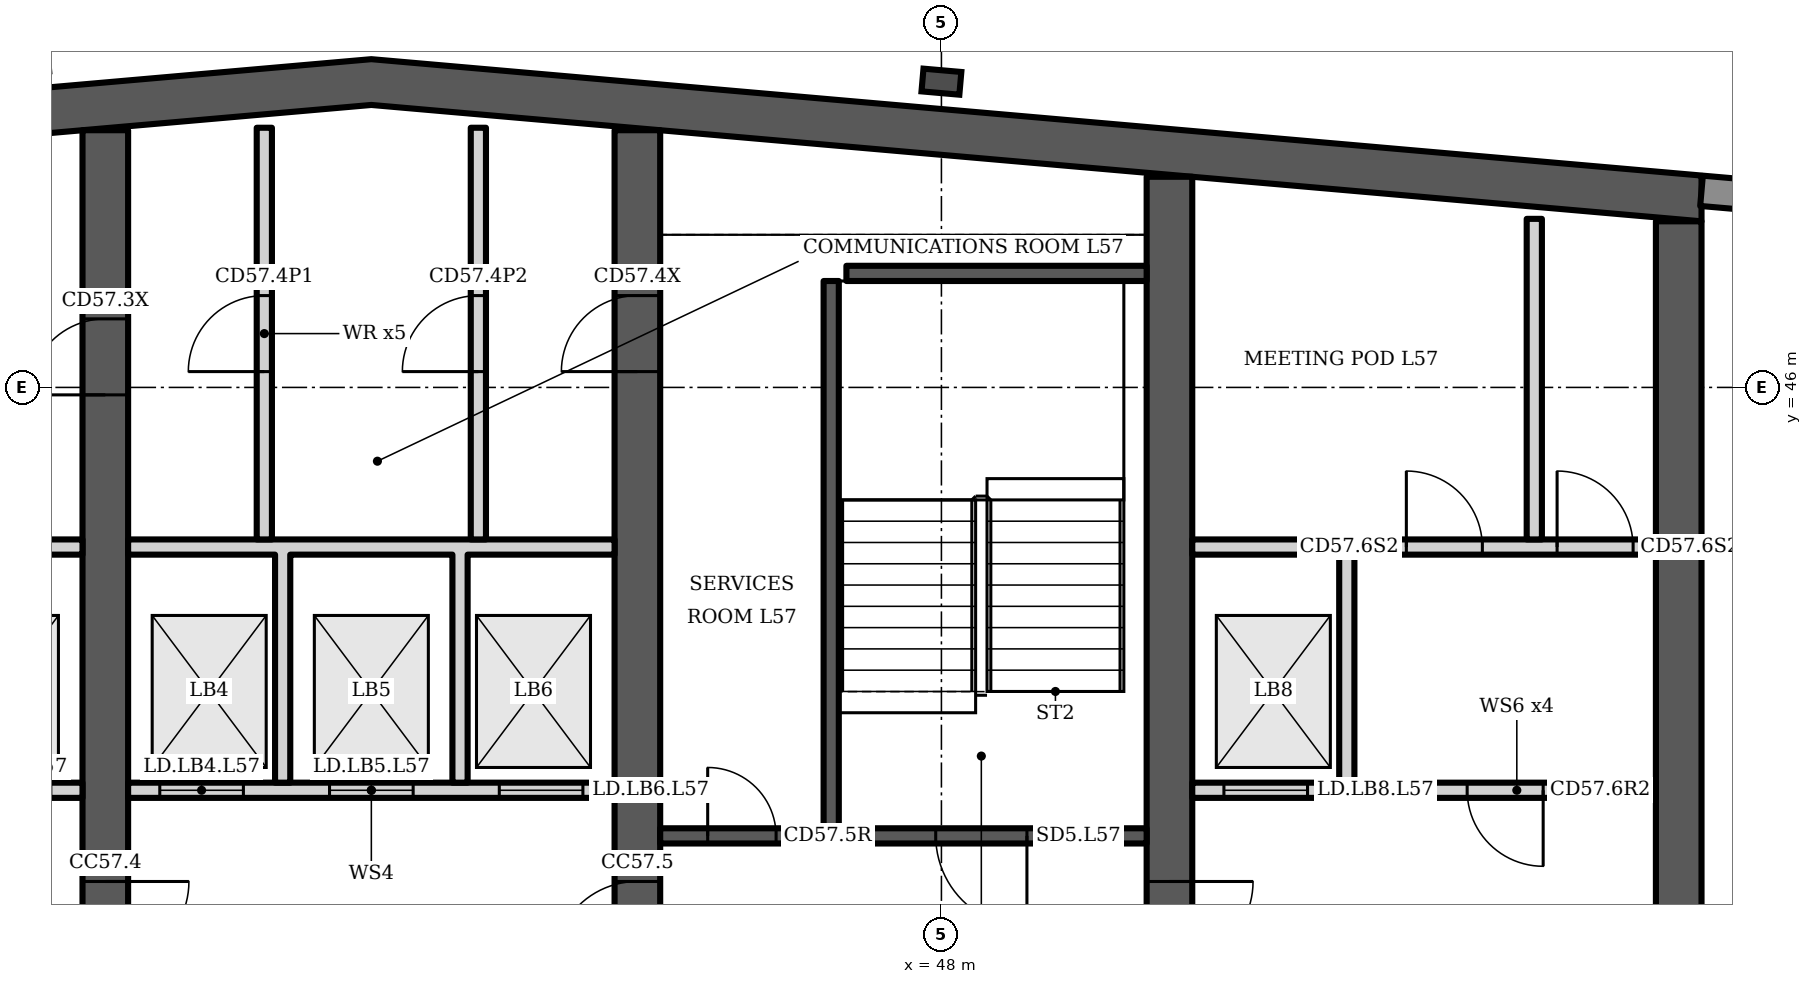
"""IFC4 building model, lengths in metres.
Left out: names, types, materials, properties, quantities, classifications, styles, units other than length and angle.
Written with IfcOpenShell. Run it as: python <this file> out.ifc"""

import sys

from ifc_helpers import new_model, si_unit, direction, frame, frame_2d, origin, origin_2d, place, context, subcontext, project, spatial, polyline, rectangle, i_section, outline, extrude, element, fill, save


model = new_model("IFC4")
c1 = context("Model", 3, precision=1e-05, world=origin(), true_north=direction((0.0, 1.0)))
c2 = subcontext(c1, "Body", "Model", "MODEL_VIEW")
j1 = project(units=[si_unit("LENGTHUNIT", "METRE"), si_unit("PLANEANGLEUNIT", "RADIAN")], contexts=[c1])
p1 = place(None, origin())
s1 = spatial("IfcSite", under=j1, at=p1, CompositionType="ELEMENT")
p2 = place(p1, origin())
s2 = spatial("IfcBuilding", under=s1, at=p2, CompositionType="ELEMENT")
p3 = place(p2, frame((0.0, 0.0, 228.7)))
s3 = spatial("IfcBuildingStorey", under=s2, at=p3, CompositionType="ELEMENT", Elevation=228.7)
p4 = place(p3, origin())
e1 = element("IfcWall", 1, at=p4, inside=s3, PredefinedType="SHEAR", context=c2, shape_type="SweptSolid", body=[
    extrude(outline(polyline([(23.0, 48.185), (40.5, 49.716), (58.0, 48.185), (58.0, 48.787), (40.5, 50.318), (23.0, 48.787), (23.0, 48.185)])), origin(), (0.0, 0.0, 1.0), 3.6),
])
p5 = place(p3, frame((37.0, 34.6, 0.0), z_axis=(0.0, 0.0, 1.0), x_axis=(0.0, 1.0, 0.0)))
e2 = element("IfcWall", 2, at=p5, inside=s3, PredefinedType="SHEAR", context=c2, shape_type="SweptSolid", body=[
    extrude(rectangle(XDim=14.784, YDim=0.6, at=frame_2d((7.392, 0.0))), origin(), (0.0, 0.0, 1.0), 3.6),
])
p6 = place(p5, frame((11.302, 0.0, 0.0)))
e3 = element("IfcOpeningElement", 3, at=p6, cuts=e2, PredefinedType="OPENING", context=c2, shape_type="SweptSolid", body=[
    extrude(rectangle(XDim=1.0, YDim=2.1, at=frame_2d((0.5, 1.05))), frame((0.0, 0.31, 0.0), z_axis=(0.0, -1.0, 0.0), x_axis=(1.0, 0.0, 0.0)), (0.0, 0.0, 1.0), 0.62),
])
p7 = place(p5, frame((3.8, 0.0, 0.0)))
e4 = element("IfcOpeningElement", 4, at=p7, cuts=e2, PredefinedType="OPENING", context=c2, shape_type="SweptSolid", body=[
    extrude(rectangle(XDim=1.1, YDim=2.1, at=frame_2d((0.55, 1.05))), frame((0.0, 0.31, 0.0), z_axis=(0.0, -1.0, 0.0), x_axis=(1.0, 0.0, 0.0)), (0.0, 0.0, 1.0), 0.62),
])
p8 = place(p3, frame((44.0, 34.6, 0.0), z_axis=(0.0, 0.0, 1.0), x_axis=(0.0, 1.0, 0.0)))
e5 = element("IfcWall", 5, at=p8, inside=s3, PredefinedType="SHEAR", context=c2, shape_type="SweptSolid", body=[
    extrude(rectangle(XDim=14.784, YDim=0.6, at=frame_2d((7.392, 0.0))), origin(), (0.0, 0.0, 1.0), 3.6),
])
p9 = place(p8, frame((11.608, 0.0, 0.0)))
e6 = element("IfcOpeningElement", 6, at=p9, cuts=e5, PredefinedType="OPENING", context=c2, shape_type="SweptSolid", body=[
    extrude(rectangle(XDim=1.0, YDim=2.1, at=frame_2d((0.5, 1.05))), frame((0.0, 0.31, 0.0), z_axis=(0.0, -1.0, 0.0), x_axis=(1.0, 0.0, 0.0)), (0.0, 0.0, 1.0), 0.62),
])
p10 = place(p8, frame((3.8, 0.0, 0.0)))
e7 = element("IfcOpeningElement", 7, at=p10, cuts=e5, PredefinedType="OPENING", context=c2, shape_type="SweptSolid", body=[
    extrude(rectangle(XDim=1.1, YDim=2.1, at=frame_2d((0.55, 1.05))), frame((0.0, 0.31, 0.0), z_axis=(0.0, -1.0, 0.0), x_axis=(1.0, 0.0, 0.0)), (0.0, 0.0, 1.0), 0.62),
])
p11 = place(p3, frame((51.0, 34.6, 0.0), z_axis=(0.0, 0.0, 1.0), x_axis=(0.0, 1.0, 0.0)))
e8 = element("IfcWall", 8, at=p11, inside=s3, PredefinedType="SHEAR", context=c2, shape_type="SweptSolid", body=[
    extrude(rectangle(XDim=14.171, YDim=0.6, at=frame_2d((7.085, 0.0))), origin(), (0.0, 0.0, 1.0), 3.6),
])
p12 = place(p11, frame((3.8, 0.0, 0.0)))
e9 = element("IfcOpeningElement", 9, at=p12, cuts=e8, PredefinedType="OPENING", context=c2, shape_type="SweptSolid", body=[
    extrude(rectangle(XDim=1.1, YDim=2.1, at=frame_2d((0.55, 1.05))), frame((0.0, 0.31, 0.0), z_axis=(0.0, -1.0, 0.0), x_axis=(1.0, 0.0, 0.0)), (0.0, 0.0, 1.0), 0.62),
])
p13 = place(p3, frame((57.7, 34.6, 0.0), z_axis=(0.0, 0.0, 1.0), x_axis=(0.0, 1.0, 0.0)))
e10 = element("IfcWall", 10, at=p13, inside=s3, PredefinedType="SHEAR", context=c2, shape_type="SweptSolid", body=[
    extrude(rectangle(XDim=13.585, YDim=0.6, at=frame_2d((6.792, 0.0))), origin(), (0.0, 0.0, 1.0), 3.6),
])
p14 = place(p3, frame((48.0, 50.022, 0.0), z_axis=(0.0, 0.0, 1.0), x_axis=(0.087156, 0.996197, 0.0)))
e11 = element("IfcColumn", 11, at=p14, inside=s3, PredefinedType="COLUMN", context=c2, shape_type="SweptSolid", body=[
    extrude(i_section(OverallWidth=0.3, OverallDepth=0.5, WebThickness=0.014, FlangeThickness=0.028, FilletRadius=0.027, at=origin_2d()), origin(), (0.0, 0.0, 1.0), 3.6),
])
p15 = place(p3, frame((60.983, 48.326, 0.0), z_axis=(0.0, 0.0, 1.0), x_axis=(-0.996194, 0.087168, 0.0)))
e12 = element("IfcWall", 12, at=p15, inside=s3, PredefinedType="SOLIDWALL", context=c2, shape_type="SweptSolid", body=[
    extrude(rectangle(XDim=2.994, YDim=0.4, at=frame_2d((1.497, 0.0))), origin(), (0.0, 0.0, 1.0), 3.2),
])
p16 = place(p3, frame((30.3, 40.7, 0.0), z_axis=(0.0, 0.0, 1.0), x_axis=(1.0, 0.0, 0.0)))
e13 = element("IfcWall", 13, at=p16, inside=s3, PredefinedType="PARTITIONING", context=c2, shape_type="SweptSolid", body=[
    extrude(rectangle(XDim=6.4, YDim=0.2, at=frame_2d((3.2, 0.0))), origin(), (0.0, 0.0, 1.0), 3.2),
])
p17 = place(p16, frame((0.417, 0.0, 0.0)))
e14 = element("IfcOpeningElement", 14, at=p17, cuts=e13, PredefinedType="OPENING", context=c2, shape_type="SweptSolid", body=[
    extrude(rectangle(XDim=1.1, YDim=2.1, at=frame_2d((0.55, 1.05))), frame((0.0, 0.11, 0.0), z_axis=(0.0, -1.0, 0.0), x_axis=(1.0, 0.0, 0.0)), (0.0, 0.0, 1.0), 0.22),
])
p18 = place(p16, frame((2.65, 0.0, 0.0)))
e15 = element("IfcOpeningElement", 15, at=p18, cuts=e13, PredefinedType="OPENING", context=c2, shape_type="SweptSolid", body=[
    extrude(rectangle(XDim=1.1, YDim=2.1, at=frame_2d((0.55, 1.05))), frame((0.0, 0.11, 0.0), z_axis=(0.0, -1.0, 0.0), x_axis=(1.0, 0.0, 0.0)), (0.0, 0.0, 1.0), 0.22),
])
p19 = place(p16, frame((4.883, 0.0, 0.0)))
e16 = element("IfcOpeningElement", 16, at=p19, cuts=e13, PredefinedType="OPENING", context=c2, shape_type="SweptSolid", body=[
    extrude(rectangle(XDim=1.1, YDim=2.1, at=frame_2d((0.55, 1.05))), frame((0.0, 0.11, 0.0), z_axis=(0.0, -1.0, 0.0), x_axis=(1.0, 0.0, 0.0)), (0.0, 0.0, 1.0), 0.22),
])
p20 = place(p3, frame((0.0, 0.0, -0.0)))
e17 = element("IfcWall", 17, at=p20, inside=s3, PredefinedType="PARTITIONING", context=c2, shape_type="SweptSolid", body=[
    extrude(outline(polyline([(32.433, 40.8), (32.233, 40.8), (32.233, 43.8), (30.3, 43.8), (30.3, 44.0), (36.7, 44.0), (36.7, 43.8), (34.767, 43.8), (34.767, 40.8), (34.567, 40.8), (34.567, 43.8), (32.433, 43.8), (32.433, 40.8)])), origin(), (0.0, 0.0, 1.0), 3.2),
])
p21 = place(p3, frame((37.3, 40.7, 0.0), z_axis=(0.0, 0.0, 1.0), x_axis=(1.0, 0.0, 0.0)))
e18 = element("IfcWall", 18, at=p21, inside=s3, PredefinedType="PARTITIONING", context=c2, shape_type="SweptSolid", body=[
    extrude(rectangle(XDim=6.4, YDim=0.2, at=frame_2d((3.2, 0.0))), origin(), (0.0, 0.0, 1.0), 3.2),
])
p22 = place(p21, frame((0.417, 0.0, 0.0)))
e19 = element("IfcOpeningElement", 19, at=p22, cuts=e18, PredefinedType="OPENING", context=c2, shape_type="SweptSolid", body=[
    extrude(rectangle(XDim=1.1, YDim=2.1, at=frame_2d((0.55, 1.05))), frame((0.0, 0.11, 0.0), z_axis=(0.0, -1.0, 0.0), x_axis=(1.0, 0.0, 0.0)), (0.0, 0.0, 1.0), 0.22),
])
p23 = place(p21, frame((2.65, 0.0, 0.0)))
e20 = element("IfcOpeningElement", 20, at=p23, cuts=e18, PredefinedType="OPENING", context=c2, shape_type="SweptSolid", body=[
    extrude(rectangle(XDim=1.1, YDim=2.1, at=frame_2d((0.55, 1.05))), frame((0.0, 0.11, 0.0), z_axis=(0.0, -1.0, 0.0), x_axis=(1.0, 0.0, 0.0)), (0.0, 0.0, 1.0), 0.22),
])
p24 = place(p21, frame((4.883, 0.0, 0.0)))
e21 = element("IfcOpeningElement", 21, at=p24, cuts=e18, PredefinedType="OPENING", context=c2, shape_type="SweptSolid", body=[
    extrude(rectangle(XDim=1.1, YDim=2.1, at=frame_2d((0.55, 1.05))), frame((0.0, 0.11, 0.0), z_axis=(0.0, -1.0, 0.0), x_axis=(1.0, 0.0, 0.0)), (0.0, 0.0, 1.0), 0.22),
])
p25 = place(p3, frame((0.0, 0.0, -0.0)))
e22 = element("IfcWall", 22, at=p25, inside=s3, PredefinedType="PARTITIONING", context=c2, shape_type="SweptSolid", body=[
    extrude(outline(polyline([(39.433, 40.8), (39.233, 40.8), (39.233, 43.8), (37.3, 43.8), (37.3, 44.0), (43.7, 44.0), (43.7, 43.8), (41.767, 43.8), (41.767, 40.8), (41.567, 40.8), (41.567, 43.8), (39.433, 43.8), (39.433, 40.8)])), origin(), (0.0, 0.0, 1.0), 3.2),
])
p26 = place(p3, frame((39.092, 44.0, 0.0), z_axis=(0.0, 0.0, 1.0), x_axis=(0.0, 1.0, 0.0)))
e23 = element("IfcWall", 23, at=p26, inside=s3, PredefinedType="PARTITIONING", context=c2, shape_type="SweptSolid", body=[
    extrude(rectangle(XDim=5.416, YDim=0.2, at=frame_2d((2.708, 0.0))), origin(), (0.0, 0.0, 1.0), 3.2),
])
p27 = place(p26, frame((2.208, 0.0, 0.0)))
e24 = element("IfcOpeningElement", 24, at=p27, cuts=e23, PredefinedType="OPENING", context=c2, shape_type="SweptSolid", body=[
    extrude(rectangle(XDim=1.0, YDim=2.1, at=frame_2d((0.5, 1.05))), frame((0.0, 0.11, 0.0), z_axis=(0.0, -1.0, 0.0), x_axis=(1.0, 0.0, 0.0)), (0.0, 0.0, 1.0), 0.22),
])
p28 = place(p3, frame((41.908, 44.0, 0.0), z_axis=(0.0, 0.0, 1.0), x_axis=(0.0, 1.0, 0.0)))
e25 = element("IfcWall", 25, at=p28, inside=s3, PredefinedType="PARTITIONING", context=c2, shape_type="SweptSolid", body=[
    extrude(rectangle(XDim=5.416, YDim=0.2, at=frame_2d((2.708, 0.0))), origin(), (0.0, 0.0, 1.0), 3.2),
])
p29 = place(p28, frame((2.208, 0.0, 0.0)))
e26 = element("IfcOpeningElement", 26, at=p29, cuts=e25, PredefinedType="OPENING", context=c2, shape_type="SweptSolid", body=[
    extrude(rectangle(XDim=1.0, YDim=2.1, at=frame_2d((0.5, 1.05))), frame((0.0, 0.11, 0.0), z_axis=(0.0, -1.0, 0.0), x_axis=(1.0, 0.0, 0.0)), (0.0, 0.0, 1.0), 0.22),
])
p30 = place(p3, frame((44.3, 40.1, 0.0), z_axis=(0.0, 0.0, 1.0), x_axis=(1.0, 0.0, 0.0)))
e27 = element("IfcWall", 27, at=p30, inside=s3, PredefinedType="SHEAR", context=c2, shape_type="SweptSolid", body=[
    extrude(rectangle(XDim=6.4, YDim=0.2, at=frame_2d((3.2, 0.0))), origin(), (0.0, 0.0, 1.0), 3.2),
])
p31 = place(p30, frame((3.625, 0.0, 0.0)))
e28 = element("IfcOpeningElement", 28, at=p31, cuts=e27, PredefinedType="OPENING", context=c2, shape_type="SweptSolid", body=[
    extrude(rectangle(XDim=1.2, YDim=2.1, at=frame_2d((0.6, 1.05))), frame((0.0, 0.11, 0.0), z_axis=(0.0, -1.0, 0.0), x_axis=(1.0, 0.0, 0.0)), (0.0, 0.0, 1.0), 0.22),
])
p32 = place(p30, frame((0.625, 0.0, 0.0)))
e29 = element("IfcOpeningElement", 29, at=p32, cuts=e27, PredefinedType="OPENING", context=c2, shape_type="SweptSolid", body=[
    extrude(rectangle(XDim=0.9, YDim=2.1, at=frame_2d((0.45, 1.05))), frame((0.0, 0.11, 0.0), z_axis=(0.0, -1.0, 0.0), x_axis=(1.0, 0.0, 0.0)), (0.0, 0.0, 1.0), 0.22),
])
p33 = place(p3, frame((46.55, 40.2, 0.0), z_axis=(0.0, 0.0, 1.0), x_axis=(0.0, 1.0, 0.0)))
e30 = element("IfcWall", 30, at=p33, inside=s3, PredefinedType="SHEAR", context=c2, shape_type="SweptSolid", body=[
    extrude(rectangle(XDim=7.2, YDim=0.2, at=frame_2d((3.6, 0.0))), origin(), (0.0, 0.0, 1.0), 3.2),
])
p34 = place(p3, frame((46.75, 47.5, 0.0), z_axis=(0.0, 0.0, 1.0), x_axis=(1.0, 0.0, 0.0)))
e31 = element("IfcWall", 31, at=p34, inside=s3, PredefinedType="SHEAR", context=c2, shape_type="SweptSolid", body=[
    extrude(rectangle(XDim=3.95, YDim=0.2, at=frame_2d((1.975, 0.0))), origin(), (0.0, 0.0, 1.0), 3.2),
])
p35 = place(p3, frame((51.3, 40.7, 0.0), z_axis=(0.0, 0.0, 1.0), x_axis=(1.0, 0.0, 0.0)))
e32 = element("IfcWall", 32, at=p35, inside=s3, PredefinedType="PARTITIONING", context=c2, shape_type="SweptSolid", body=[
    extrude(rectangle(XDim=6.1, YDim=0.2, at=frame_2d((3.05, 0.0))), origin(), (0.0, 0.0, 1.0), 3.2),
])
p36 = place(p35, frame((0.417, 0.0, 0.0)))
e33 = element("IfcOpeningElement", 33, at=p36, cuts=e32, PredefinedType="OPENING", context=c2, shape_type="SweptSolid", body=[
    extrude(rectangle(XDim=1.1, YDim=2.1, at=frame_2d((0.55, 1.05))), frame((0.0, 0.11, 0.0), z_axis=(0.0, -1.0, 0.0), x_axis=(1.0, 0.0, 0.0)), (0.0, 0.0, 1.0), 0.22),
])
p37 = place(p35, frame((3.617, 0.0, 0.0)))
e34 = element("IfcOpeningElement", 34, at=p37, cuts=e32, PredefinedType="OPENING", context=c2, shape_type="SweptSolid", body=[
    extrude(rectangle(XDim=1.0, YDim=2.1, at=frame_2d((0.5, 1.05))), frame((0.0, 0.11, 0.0), z_axis=(0.0, -1.0, 0.0), x_axis=(1.0, 0.0, 0.0)), (0.0, 0.0, 1.0), 0.22),
])
p38 = place(p3, frame((51.3, 43.9, 0.0), z_axis=(0.0, 0.0, 1.0), x_axis=(1.0, 0.0, 0.0)))
e35 = element("IfcWall", 35, at=p38, inside=s3, PredefinedType="PARTITIONING", context=c2, shape_type="SweptSolid", body=[
    extrude(rectangle(XDim=6.1, YDim=0.2, at=frame_2d((3.05, 0.0))), origin(), (0.0, 0.0, 1.0), 3.2),
])
p39 = place(p38, frame((2.817, 0.0, 0.0)))
e36 = element("IfcOpeningElement", 36, at=p39, cuts=e35, PredefinedType="OPENING", context=c2, shape_type="SweptSolid", body=[
    extrude(rectangle(XDim=1.0, YDim=2.1, at=frame_2d((0.5, 1.05))), frame((0.0, 0.11, 0.0), z_axis=(0.0, -1.0, 0.0), x_axis=(1.0, 0.0, 0.0)), (0.0, 0.0, 1.0), 0.22),
])
p40 = place(p38, frame((4.8, 0.0, 0.0)))
e37 = element("IfcOpeningElement", 37, at=p40, cuts=e35, PredefinedType="OPENING", context=c2, shape_type="SweptSolid", body=[
    extrude(rectangle(XDim=1.0, YDim=2.1, at=frame_2d((0.5, 1.05))), frame((0.0, 0.11, 0.0), z_axis=(0.0, -1.0, 0.0), x_axis=(1.0, 0.0, 0.0)), (0.0, 0.0, 1.0), 0.22),
])
p41 = place(p3, frame((0.0, 0.0, -0.0)))
e38 = element("IfcWall", 38, at=p41, inside=s3, PredefinedType="PARTITIONING", context=c2, shape_type="SweptSolid", body=[
    extrude(outline(polyline([(53.433, 40.8), (53.433, 43.8), (53.233, 43.8), (53.233, 40.8), (53.433, 40.8)])), origin(), (0.0, 0.0, 1.0), 3.2),
])
p42 = place(p3, frame((55.8, 44.0, 0.0), z_axis=(0.0, 0.0, 1.0), x_axis=(0.0, 1.0, 0.0)))
e39 = element("IfcWall", 39, at=p42, inside=s3, PredefinedType="PARTITIONING", context=c2, shape_type="SweptSolid", body=[
    extrude(rectangle(XDim=4.218, YDim=0.2, at=frame_2d((2.109, 0.0))), origin(), (0.0, 0.0, 1.0), 3.2),
])
p43 = place(p6, origin())
e40 = element("IfcDoor", 40, at=p43, inside=s3, OperationType="SINGLE_SWING_LEFT", PredefinedType="DOOR", context=c2, shape_type="SweptSolid", body=[
    extrude(rectangle(XDim=1.0, YDim=2.1, at=frame_2d((0.5, 1.05))), frame((0.0, 0.025, 0.0), z_axis=(0.0, -1.0, 0.0), x_axis=(1.0, 0.0, 0.0)), (0.0, 0.0, 1.0), 0.05),
])
fill(e3, e40)
p44 = place(p22, origin())
e41 = element("IfcDoor", 41, at=p44, inside=s3, OperationType="DOUBLE_DOOR_SLIDING", PredefinedType="DOOR", context=c2, shape_type="SweptSolid", body=[
    extrude(rectangle(XDim=1.1, YDim=2.1, at=frame_2d((0.55, 1.05))), frame((0.0, 0.025, 0.0), z_axis=(0.0, -1.0, 0.0), x_axis=(1.0, 0.0, 0.0)), (0.0, 0.0, 1.0), 0.05),
])
fill(e19, e41)
p45 = place(p23, origin())
e42 = element("IfcDoor", 42, at=p45, inside=s3, OperationType="DOUBLE_DOOR_SLIDING", PredefinedType="DOOR", context=c2, shape_type="SweptSolid", body=[
    extrude(rectangle(XDim=1.1, YDim=2.1, at=frame_2d((0.55, 1.05))), frame((0.0, 0.025, 0.0), z_axis=(0.0, -1.0, 0.0), x_axis=(1.0, 0.0, 0.0)), (0.0, 0.0, 1.0), 0.05),
])
fill(e20, e42)
p46 = place(p24, origin())
e43 = element("IfcDoor", 43, at=p46, inside=s3, OperationType="DOUBLE_DOOR_SLIDING", PredefinedType="DOOR", context=c2, shape_type="SweptSolid", body=[
    extrude(rectangle(XDim=1.1, YDim=2.1, at=frame_2d((0.55, 1.05))), frame((0.0, 0.025, 0.0), z_axis=(0.0, -1.0, 0.0), x_axis=(1.0, 0.0, 0.0)), (0.0, 0.0, 1.0), 0.05),
])
fill(e21, e43)
p47 = place(p27, origin())
e44 = element("IfcDoor", 44, at=p47, inside=s3, OperationType="SINGLE_SWING_LEFT", PredefinedType="DOOR", context=c2, shape_type="SweptSolid", body=[
    extrude(rectangle(XDim=1.0, YDim=2.1, at=frame_2d((0.5, 1.05))), frame((0.0, 0.025, 0.0), z_axis=(0.0, -1.0, 0.0), x_axis=(1.0, 0.0, 0.0)), (0.0, 0.0, 1.0), 0.05),
])
fill(e24, e44)
p48 = place(p29, origin())
e45 = element("IfcDoor", 45, at=p48, inside=s3, OperationType="SINGLE_SWING_LEFT", PredefinedType="DOOR", context=c2, shape_type="SweptSolid", body=[
    extrude(rectangle(XDim=1.0, YDim=2.1, at=frame_2d((0.5, 1.05))), frame((0.0, 0.025, 0.0), z_axis=(0.0, -1.0, 0.0), x_axis=(1.0, 0.0, 0.0)), (0.0, 0.0, 1.0), 0.05),
])
fill(e26, e45)
p49 = place(p9, origin())
e46 = element("IfcDoor", 46, at=p49, inside=s3, OperationType="SINGLE_SWING_LEFT", PredefinedType="DOOR", context=c2, shape_type="SweptSolid", body=[
    extrude(rectangle(XDim=1.0, YDim=2.1, at=frame_2d((0.5, 1.05))), frame((0.0, 0.025, 0.0), z_axis=(0.0, -1.0, 0.0), x_axis=(1.0, 0.0, 0.0)), (0.0, 0.0, 1.0), 0.05),
])
fill(e6, e46)
p50 = place(p31, origin())
e47 = element("IfcDoor", 47, at=p50, inside=s3, OperationType="SINGLE_SWING_RIGHT", PredefinedType="DOOR", context=c2, shape_type="SweptSolid", body=[
    extrude(rectangle(XDim=1.2, YDim=2.1, at=frame_2d((0.6, 1.05))), frame((0.0, 0.025, 0.0), z_axis=(0.0, -1.0, 0.0), x_axis=(1.0, 0.0, 0.0)), (0.0, 0.0, 1.0), 0.05),
])
fill(e28, e47)
p51 = place(p32, origin())
e48 = element("IfcDoor", 48, at=p51, inside=s3, OperationType="SINGLE_SWING_LEFT", PredefinedType="DOOR", context=c2, shape_type="SweptSolid", body=[
    extrude(rectangle(XDim=0.9, YDim=2.1, at=frame_2d((0.45, 1.05))), frame((0.0, 0.025, 0.0), z_axis=(0.0, -1.0, 0.0), x_axis=(1.0, 0.0, 0.0)), (0.0, 0.0, 1.0), 0.05),
])
fill(e29, e48)
p52 = place(p36, origin())
e49 = element("IfcDoor", 49, at=p52, inside=s3, OperationType="DOUBLE_DOOR_SLIDING", PredefinedType="DOOR", context=c2, shape_type="SweptSolid", body=[
    extrude(rectangle(XDim=1.1, YDim=2.1, at=frame_2d((0.55, 1.05))), frame((0.0, 0.025, 0.0), z_axis=(0.0, -1.0, 0.0), x_axis=(1.0, 0.0, 0.0)), (0.0, 0.0, 1.0), 0.05),
])
fill(e33, e49)
p53 = place(p37, origin())
e50 = element("IfcDoor", 50, at=p53, inside=s3, OperationType="SINGLE_SWING_RIGHT", PredefinedType="DOOR", context=c2, shape_type="SweptSolid", body=[
    extrude(rectangle(XDim=1.0, YDim=2.1, at=frame_2d((0.5, 1.05))), frame((0.0, 0.025, 0.0), z_axis=(0.0, -1.0, 0.0), x_axis=(1.0, 0.0, 0.0)), (0.0, 0.0, 1.0), 0.05),
])
fill(e34, e50)
p54 = place(p39, origin())
e51 = element("IfcDoor", 51, at=p54, inside=s3, OperationType="SINGLE_SWING_LEFT", PredefinedType="DOOR", context=c2, shape_type="SweptSolid", body=[
    extrude(rectangle(XDim=1.0, YDim=2.1, at=frame_2d((0.5, 1.05))), frame((0.0, 0.025, 0.0), z_axis=(0.0, -1.0, 0.0), x_axis=(1.0, 0.0, 0.0)), (0.0, 0.0, 1.0), 0.05),
])
fill(e36, e51)
p55 = place(p40, origin())
e52 = element("IfcDoor", 52, at=p55, inside=s3, OperationType="SINGLE_SWING_LEFT", PredefinedType="DOOR", context=c2, shape_type="SweptSolid", body=[
    extrude(rectangle(XDim=1.0, YDim=2.1, at=frame_2d((0.5, 1.05))), frame((0.0, 0.025, 0.0), z_axis=(0.0, -1.0, 0.0), x_axis=(1.0, 0.0, 0.0)), (0.0, 0.0, 1.0), 0.05),
])
fill(e37, e52)
p56 = place(p7, origin())
e53 = element("IfcDoor", 53, at=p56, inside=s3, OperationType="SINGLE_SWING_RIGHT", PredefinedType="DOOR", context=c2, shape_type="SweptSolid", body=[
    extrude(rectangle(XDim=1.1, YDim=2.1, at=frame_2d((0.55, 1.05))), frame((0.0, 0.025, 0.0), z_axis=(0.0, -1.0, 0.0), x_axis=(1.0, 0.0, 0.0)), (0.0, 0.0, 1.0), 0.05),
])
fill(e4, e53)
p57 = place(p10, origin())
e54 = element("IfcDoor", 54, at=p57, inside=s3, OperationType="SINGLE_SWING_LEFT", PredefinedType="DOOR", context=c2, shape_type="SweptSolid", body=[
    extrude(rectangle(XDim=1.1, YDim=2.1, at=frame_2d((0.55, 1.05))), frame((0.0, 0.025, 0.0), z_axis=(0.0, -1.0, 0.0), x_axis=(1.0, 0.0, 0.0)), (0.0, 0.0, 1.0), 0.05),
])
fill(e7, e54)
p58 = place(p12, origin())
e55 = element("IfcDoor", 55, at=p58, inside=s3, OperationType="SINGLE_SWING_RIGHT", PredefinedType="DOOR", context=c2, shape_type="SweptSolid", body=[
    extrude(rectangle(XDim=1.1, YDim=2.1, at=frame_2d((0.55, 1.05))), frame((0.0, 0.025, 0.0), z_axis=(0.0, -1.0, 0.0), x_axis=(1.0, 0.0, 0.0)), (0.0, 0.0, 1.0), 0.05),
])
fill(e9, e55)
save(model, sys.argv[1])
